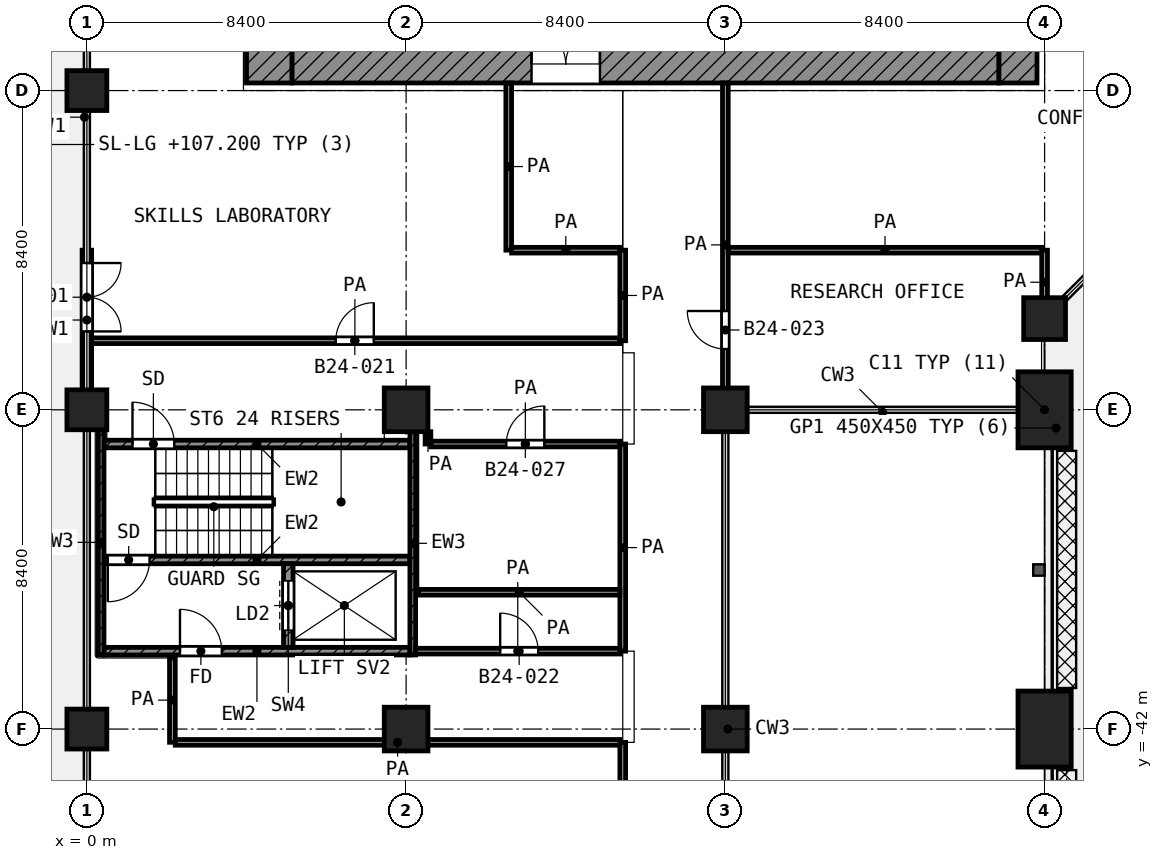
"""IFC4 building model, lengths in metres.
Left out: names, types, materials, properties, quantities, classifications, styles, units other than length and angle.
Written with IfcOpenShell. Run it as: python <this file> out.ifc"""

import sys

from ifc_helpers import new_model, si_unit, direction, frame, frame_2d, origin, origin_2d, place, context, subcontext, project, spatial, rectangle, extrude, element, fill, save


model = new_model("IFC4")
c1 = context("Model", 3, precision=1e-05, world=origin(), true_north=direction((0.0, 1.0)))
c2 = subcontext(c1, "Body", "Model", "MODEL_VIEW")
j1 = project(units=[si_unit("LENGTHUNIT", "METRE"), si_unit("PLANEANGLEUNIT", "RADIAN")], contexts=[c1])
p1 = place(None, origin())
s1 = spatial("IfcSite", under=j1, at=p1, CompositionType="ELEMENT")
p2 = place(p1, origin())
s2 = spatial("IfcBuilding", under=s1, at=p2, CompositionType="ELEMENT")
p3 = place(p2, frame((0.0, 0.0, 107.2)))
s3 = spatial("IfcBuildingStorey", under=s2, at=p3, CompositionType="ELEMENT", Elevation=107.2)
p4 = place(p3, frame((0.0, -25.2, 0.0), z_axis=(0.0, 0.0, 1.0), x_axis=(1.0, 0.0, 0.0)))
e1 = element("IfcColumn", 1, at=p4, inside=s3, PredefinedType="COLUMN", context=c2, shape_type="SweptSolid", body=[
    extrude(rectangle(XDim=1.05, YDim=1.05, at=origin_2d()), origin(), (0.0, 0.0, 1.0), 4.2),
])
p5 = place(p3, frame((25.2, -31.2, 0.0), z_axis=(0.0, 0.0, 1.0), x_axis=(1.0, 0.0, 0.0)))
e2 = element("IfcColumn", 2, at=p5, inside=s3, PredefinedType="COLUMN", context=c2, shape_type="SweptSolid", body=[
    extrude(rectangle(XDim=1.1, YDim=1.1, at=origin_2d()), origin(), (0.0, 0.0, 1.0), 4.2),
])
p6 = place(p3, frame((0.0, -33.6, 0.0), z_axis=(0.0, 0.0, 1.0), x_axis=(1.0, 0.0, 0.0)))
e3 = element("IfcColumn", 3, at=p6, inside=s3, PredefinedType="COLUMN", context=c2, shape_type="SweptSolid", body=[
    extrude(rectangle(XDim=1.05, YDim=1.05, at=origin_2d()), origin(), (0.0, 0.0, 1.0), 4.2),
])
for number, where, z_axis, x_axis in (
    (4, (8.4, -33.6, 0.0), (0.0, 0.0, 1.0), (1.0, 0.0, 0.0)),
    (5, (16.8, -33.6, 0.0), (0.0, 0.0, 1.0), (1.0, 0.0, 0.0)),
):
    element("IfcColumn", number, at=place(p3, frame(where, z_axis=z_axis, x_axis=x_axis)), inside=s3, PredefinedType="COLUMN", context=c2, shape_type="SweptSolid", body=[
        extrude(rectangle(XDim=1.15, YDim=1.15, at=origin_2d()), origin(), (0.0, 0.0, 1.0), 4.2),
    ])
p7 = place(p3, frame((0.0, -42.0, 0.0), z_axis=(0.0, 0.0, 1.0), x_axis=(1.0, 0.0, 0.0)))
e6 = element("IfcColumn", 6, at=p7, inside=s3, PredefinedType="COLUMN", context=c2, shape_type="SweptSolid", body=[
    extrude(rectangle(XDim=1.05, YDim=1.05, at=origin_2d()), origin(), (0.0, 0.0, 1.0), 4.2),
])
for number, where, z_axis, x_axis in (
    (7, (8.4, -42.0, 0.0), (0.0, 0.0, 1.0), (1.0, 0.0, 0.0)),
    (8, (16.8, -42.0, 0.0), (0.0, 0.0, 1.0), (1.0, 0.0, 0.0)),
):
    element("IfcColumn", number, at=place(p3, frame(where, z_axis=z_axis, x_axis=x_axis)), inside=s3, PredefinedType="COLUMN", context=c2, shape_type="SweptSolid", body=[
        extrude(rectangle(XDim=1.15, YDim=1.15, at=origin_2d()), origin(), (0.0, 0.0, 1.0), 4.2),
    ])
for number, where, z_axis, x_axis in (
    (9, (25.2, -42.0, 0.0), (0.0, 0.0, 1.0), (0.0, -1.0, 0.0)),
    (10, (25.2, -33.6, 0.0), (0.0, 0.0, 1.0), (0.0, -1.0, 0.0)),
):
    element("IfcColumn", number, at=place(p3, frame(where, z_axis=z_axis, x_axis=x_axis)), inside=s3, PredefinedType="COLUMN", context=c2, shape_type="SweptSolid", body=[
        extrude(rectangle(XDim=2.0, YDim=1.4, at=origin_2d()), origin(), (0.0, 0.0, 1.0), 4.2),
    ])
p8 = place(p3, frame((0.0, -29.4, 0.0), z_axis=(0.0, 0.0, 1.0), x_axis=(0.0, -1.0, 0.0)))
e11 = element("IfcWall", 11, at=p8, inside=s3, PredefinedType="SOLIDWALL", context=c2, shape_type="SweptSolid", body=[
    extrude(rectangle(XDim=3.675, YDim=0.25, at=frame_2d((1.837, 0.0))), origin(), (0.0, 0.0, 1.0), 3.48),
])
p9 = place(p8, frame((0.337, 0.0, 0.0)))
e12 = element("IfcOpeningElement", 12, at=p9, cuts=e11, PredefinedType="OPENING", context=c2, shape_type="SweptSolid", body=[
    extrude(rectangle(XDim=1.8, YDim=2.1, at=frame_2d((0.9, 1.05))), frame((0.0, 0.135, 0.0), z_axis=(0.0, -1.0, 0.0), x_axis=(1.0, 0.0, 0.0)), (0.0, 0.0, 1.0), 0.27),
])
p10 = place(p3, frame((4.8, -25.0, 0.0), z_axis=(0.0, 0.0, 1.0), x_axis=(0.0, 1.0, 0.0)))
e13 = element("IfcWall", 13, at=p10, inside=s3, PredefinedType="SHEAR", context=c2, shape_type="SweptSolid", body=[
    extrude(rectangle(XDim=19.6, YDim=1.2, at=frame_2d((9.8, 0.0))), origin(), (0.0, 0.0, 1.0), 3.6),
])
p11 = place(p10, frame((11.45, 0.0, 0.0)))
e14 = element("IfcOpeningElement", 14, at=p11, cuts=e13, PredefinedType="OPENING", context=c2, shape_type="SweptSolid", body=[
    extrude(rectangle(XDim=1.1, YDim=2.1, at=frame_2d((0.55, 1.05))), frame((0.0, 0.61, 0.0), z_axis=(0.0, -1.0, 0.0), x_axis=(1.0, 0.0, 0.0)), (0.0, 0.0, 1.0), 1.22),
])
p12 = place(p10, frame((2.15, 0.0, 0.0)))
e15 = element("IfcOpeningElement", 15, at=p12, cuts=e13, PredefinedType="OPENING", context=c2, shape_type="SweptSolid", body=[
    extrude(rectangle(XDim=1.1, YDim=2.1, at=frame_2d((0.55, 1.05))), frame((0.0, 0.61, 0.0), z_axis=(0.0, -1.0, 0.0), x_axis=(1.0, 0.0, 0.0)), (0.0, 0.0, 1.0), 1.22),
])
p13 = place(p3, frame((5.4, -24.5, 0.0), z_axis=(0.0, 0.0, 1.0), x_axis=(1.0, 0.0, 0.0)))
e16 = element("IfcWall", 16, at=p13, inside=s3, PredefinedType="SHEAR", context=c2, shape_type="SweptSolid", body=[
    extrude(rectangle(XDim=18.6, YDim=1.0, at=frame_2d((9.3, 0.0))), origin(), (0.0, 0.0, 1.0), 3.6),
])
p14 = place(p13, frame((6.3, 0.0, 0.0)))
e17 = element("IfcOpeningElement", 17, at=p14, cuts=e16, PredefinedType="OPENING", context=c2, shape_type="SweptSolid", body=[
    extrude(rectangle(XDim=1.8, YDim=2.1, at=frame_2d((0.9, 1.05))), frame((0.0, 0.51, 0.0), z_axis=(0.0, -1.0, 0.0), x_axis=(1.0, 0.0, 0.0)), (0.0, 0.0, 1.0), 1.02),
])
p15 = place(p3, frame((24.5, -25.0, 0.0), z_axis=(0.0, 0.0, 1.0), x_axis=(0.0, 1.0, 0.0)))
e18 = element("IfcWall", 18, at=p15, inside=s3, PredefinedType="SHEAR", context=c2, shape_type="SweptSolid", body=[
    extrude(rectangle(XDim=1.0, YDim=1.0, at=frame_2d((0.5, 0.0))), origin(), (0.0, 0.0, 1.0), 3.6),
])
p16 = place(p3, frame((0.375, -40.05, 0.0), z_axis=(0.0, 0.0, 1.0), x_axis=(0.0, 1.0, 0.0)))
e19 = element("IfcWall", 19, at=p16, inside=s3, PredefinedType="SHEAR", context=c2, shape_type="SweptSolid", body=[
    extrude(rectangle(XDim=5.925, YDim=0.15, at=frame_2d((2.962, 0.0))), origin(), (0.0, 0.0, 1.0), 3.6),
])
p17 = place(p3, frame((8.575, -40.05, 0.0), z_axis=(0.0, 0.0, 1.0), x_axis=(0.0, 1.0, 0.0)))
e20 = element("IfcWall", 20, at=p17, inside=s3, PredefinedType="SHEAR", context=c2, shape_type="SweptSolid", body=[
    extrude(rectangle(XDim=5.875, YDim=0.15, at=frame_2d((2.938, 0.0))), origin(), (0.0, 0.0, 1.0), 3.6),
])
p18 = place(p3, frame((0.45, -34.5, 0.0), z_axis=(0.0, 0.0, 1.0), x_axis=(1.0, 0.0, 0.0)))
e21 = element("IfcWall", 21, at=p18, inside=s3, PredefinedType="SHEAR", context=c2, shape_type="SweptSolid", body=[
    extrude(rectangle(XDim=8.05, YDim=0.2, at=frame_2d((4.025, 0.0))), origin(), (0.0, 0.0, 1.0), 3.6),
])
p19 = place(p18, frame((0.75, 0.0, 0.0)))
e22 = element("IfcOpeningElement", 22, at=p19, cuts=e21, PredefinedType="OPENING", context=c2, shape_type="SweptSolid", body=[
    extrude(rectangle(XDim=1.1, YDim=2.1, at=frame_2d((0.55, 1.05))), frame((0.0, 0.11, 0.0), z_axis=(0.0, -1.0, 0.0), x_axis=(1.0, 0.0, 0.0)), (0.0, 0.0, 1.0), 0.22),
])
p20 = place(p3, frame((0.45, -37.55, 0.0), z_axis=(0.0, 0.0, 1.0), x_axis=(1.0, 0.0, 0.0)))
e23 = element("IfcWall", 23, at=p20, inside=s3, PredefinedType="SHEAR", context=c2, shape_type="SweptSolid", body=[
    extrude(rectangle(XDim=8.05, YDim=0.2, at=frame_2d((4.025, 0.0))), origin(), (0.0, 0.0, 1.0), 3.6),
])
p21 = place(p20, frame((0.1, 0.0, 0.0)))
e24 = element("IfcOpeningElement", 24, at=p21, cuts=e23, PredefinedType="OPENING", context=c2, shape_type="SweptSolid", body=[
    extrude(rectangle(XDim=1.1, YDim=2.1, at=frame_2d((0.55, 1.05))), frame((0.0, 0.11, 0.0), z_axis=(0.0, -1.0, 0.0), x_axis=(1.0, 0.0, 0.0)), (0.0, 0.0, 1.0), 0.22),
])
p22 = place(p3, frame((0.45, -39.95, 0.0), z_axis=(0.0, 0.0, 1.0), x_axis=(1.0, 0.0, 0.0)))
e25 = element("IfcWall", 25, at=p22, inside=s3, PredefinedType="SHEAR", context=c2, shape_type="SweptSolid", body=[
    extrude(rectangle(XDim=8.05, YDim=0.2, at=frame_2d((4.025, 0.0))), origin(), (0.0, 0.0, 1.0), 3.6),
])
p23 = place(p22, frame((2.0, 0.0, 0.0)))
e26 = element("IfcOpeningElement", 26, at=p23, cuts=e25, PredefinedType="OPENING", context=c2, shape_type="SweptSolid", body=[
    extrude(rectangle(XDim=1.1, YDim=2.1, at=frame_2d((0.55, 1.05))), frame((0.0, 0.11, 0.0), z_axis=(0.0, -1.0, 0.0), x_axis=(1.0, 0.0, 0.0)), (0.0, 0.0, 1.0), 0.22),
])
p24 = place(p3, frame((5.3, -39.85, 0.0), z_axis=(0.0, 0.0, 1.0), x_axis=(0.0, 1.0, 0.0)))
e27 = element("IfcWall", 27, at=p24, inside=s3, PredefinedType="SHEAR", context=c2, shape_type="SweptSolid", body=[
    extrude(rectangle(XDim=2.2, YDim=0.25, at=frame_2d((1.1, 0.0))), origin(), (0.0, 0.0, 1.0), 3.6),
])
p25 = place(p24, frame((0.45, 0.0, 0.0)))
e28 = element("IfcOpeningElement", 28, at=p25, cuts=e27, PredefinedType="OPENING", context=c2, shape_type="SweptSolid", body=[
    extrude(rectangle(XDim=1.3, YDim=2.1, at=frame_2d((0.65, 1.05))), frame((0.0, 0.135, 0.0), z_axis=(0.0, -1.0, 0.0), x_axis=(1.0, 0.0, 0.0)), (0.0, 0.0, 1.0), 0.27),
])
p26 = place(p3, frame((2.326, -42.35, 0.0), z_axis=(0.0, 0.0, 1.0), x_axis=(1.0, 0.0, 0.0)))
e29 = element("IfcWall", 29, at=p26, inside=s3, PredefinedType="PARTITIONING", context=c2, shape_type="SweptSolid", body=[
    extrude(rectangle(XDim=11.699, YDim=0.15, at=frame_2d((5.85, 0.0))), origin(), (0.0, 0.0, 1.0), 3.6),
])
p27 = place(p3, frame((8.65, -39.95, 0.0), z_axis=(0.0, 0.0, 1.0), x_axis=(1.0, 0.0, 0.0)))
e30 = element("IfcWall", 30, at=p27, inside=s3, PredefinedType="PARTITIONING", context=c2, shape_type="SweptSolid", body=[
    extrude(rectangle(XDim=5.375, YDim=0.15, at=frame_2d((2.688, 0.0))), origin(), (0.0, 0.0, 1.0), 3.6),
])
p28 = place(p27, frame((2.225, 0.0, 0.0)))
e31 = element("IfcOpeningElement", 31, at=p28, cuts=e30, PredefinedType="OPENING", context=c2, shape_type="SweptSolid", body=[
    extrude(rectangle(XDim=1.0, YDim=2.1, at=frame_2d((0.5, 1.05))), frame((0.0, 0.085, 0.0), z_axis=(0.0, -1.0, 0.0), x_axis=(1.0, 0.0, 0.0)), (0.0, 0.0, 1.0), 0.17),
])
p29 = place(p3, frame((8.73, -38.4, 0.0), z_axis=(0.0, 0.0, 1.0), x_axis=(1.0, 0.0, 0.0)))
e32 = element("IfcWall", 32, at=p29, inside=s3, PredefinedType="PARTITIONING", context=c2, shape_type="SweptSolid", body=[
    extrude(rectangle(XDim=5.295, YDim=0.15, at=frame_2d((2.647, 0.0))), origin(), (0.0, 0.0, 1.0), 3.6),
])
p30 = place(p3, frame((9.05, -34.5, 0.0), z_axis=(0.0, 0.0, 1.0), x_axis=(1.0, 0.0, 0.0)))
e33 = element("IfcWall", 33, at=p30, inside=s3, PredefinedType="PARTITIONING", context=c2, shape_type="SweptSolid", body=[
    extrude(rectangle(XDim=4.975, YDim=0.15, at=frame_2d((2.487, 0.0))), origin(), (0.0, 0.0, 1.0), 3.6),
])
p31 = place(p30, frame((1.987, 0.0, 0.0)))
e34 = element("IfcOpeningElement", 34, at=p31, cuts=e33, PredefinedType="OPENING", context=c2, shape_type="SweptSolid", body=[
    extrude(rectangle(XDim=1.0, YDim=2.1, at=frame_2d((0.5, 1.05))), frame((0.0, 0.085, 0.0), z_axis=(0.0, -1.0, 0.0), x_axis=(1.0, 0.0, 0.0)), (0.0, 0.0, 1.0), 0.17),
])
p32 = place(p3, frame((0.08, -31.782, 0.0), z_axis=(0.0, 0.0, 1.0), x_axis=(1.0, 0.0, 0.0)))
e35 = element("IfcWall", 35, at=p32, inside=s3, PredefinedType="PARTITIONING", context=c2, shape_type="SweptSolid", body=[
    extrude(rectangle(XDim=13.945, YDim=0.15, at=frame_2d((6.972, 0.0))), origin(), (0.0, 0.0, 1.0), 3.6),
])
p33 = place(p32, frame((6.47, 0.0, 0.0)))
e36 = element("IfcOpeningElement", 36, at=p33, cuts=e35, PredefinedType="OPENING", context=c2, shape_type="SweptSolid", body=[
    extrude(rectangle(XDim=1.0, YDim=2.1, at=frame_2d((0.5, 1.05))), frame((0.0, 0.085, 0.0), z_axis=(0.0, -1.0, 0.0), x_axis=(1.0, 0.0, 0.0)), (0.0, 0.0, 1.0), 0.17),
])
p34 = place(p3, frame((11.177, -29.4, 0.0), z_axis=(0.0, 0.0, 1.0), x_axis=(1.0, 0.0, 0.0)))
e37 = element("IfcWall", 37, at=p34, inside=s3, PredefinedType="PARTITIONING", context=c2, shape_type="SweptSolid", body=[
    extrude(rectangle(XDim=2.848, YDim=0.15, at=frame_2d((1.424, 0.0))), origin(), (0.0, 0.0, 1.0), 3.6),
])
p35 = place(p3, frame((16.875, -29.4, 0.0), z_axis=(0.0, 0.0, 1.0), x_axis=(1.0, 0.0, 0.0)))
e38 = element("IfcWall", 38, at=p35, inside=s3, PredefinedType="PARTITIONING", context=c2, shape_type="SweptSolid", body=[
    extrude(rectangle(XDim=8.25, YDim=0.15, at=frame_2d((4.125, 0.0))), origin(), (0.0, 0.0, 1.0), 3.6),
])
p36 = place(p3, frame((2.25, -42.348, 0.0), z_axis=(0.0, 0.0, 1.0), x_axis=(0.0, 1.0, 0.0)))
e39 = element("IfcWall", 39, at=p36, inside=s3, PredefinedType="PARTITIONING", context=c2, shape_type="SweptSolid", body=[
    extrude(rectangle(XDim=2.218, YDim=0.15, at=frame_2d((1.109, 0.0))), origin(), (0.0, 0.0, 1.0), 3.6),
])
p37 = place(p3, frame((8.975, -34.5, 0.0), z_axis=(0.0, 0.0, 1.0), x_axis=(0.0, 1.0, 0.0)))
e40 = element("IfcWall", 40, at=p37, inside=s3, PredefinedType="PARTITIONING", context=c2, shape_type="SweptSolid", body=[
    extrude(rectangle(XDim=0.324, YDim=0.15, at=frame_2d((0.162, 0.0))), origin(), (0.0, 0.0, 1.0), 3.6),
])
p38 = place(p3, frame((11.1, -29.399, 0.0), z_axis=(0.0, 0.0, 1.0), x_axis=(0.0, 1.0, 0.0)))
e41 = element("IfcWall", 41, at=p38, inside=s3, PredefinedType="PARTITIONING", context=c2, shape_type="SweptSolid", body=[
    extrude(rectangle(XDim=4.399, YDim=0.15, at=frame_2d((2.199, 0.0))), origin(), (0.0, 0.0, 1.0), 3.6),
])
p39 = place(p3, frame((14.1, -58.72, 0.0), z_axis=(0.0, 0.0, 1.0), x_axis=(0.0, 1.0, 0.0)))
e42 = element("IfcWall", 42, at=p39, inside=s3, PredefinedType="PARTITIONING", context=c2, shape_type="SweptSolid", body=[
    extrude(rectangle(XDim=16.37, YDim=0.15, at=frame_2d((8.185, 0.0))), origin(), (0.0, 0.0, 1.0), 2.7),
])
p40 = place(p39, frame((7.395, 0.0, 0.0)))
e43 = element("IfcOpeningElement", 43, at=p40, cuts=e42, PredefinedType="OPENING", context=c2, shape_type="SweptSolid", body=[
    extrude(rectangle(XDim=1.5, YDim=2.1, at=frame_2d((0.75, 1.05))), frame((0.0, 0.085, 0.0), z_axis=(0.0, -1.0, 0.0), x_axis=(1.0, 0.0, 0.0)), (0.0, 0.0, 1.0), 0.17),
])
p41 = place(p3, frame((14.1, -39.95, 0.0), z_axis=(0.0, 0.0, 1.0), x_axis=(0.0, 1.0, 0.0)))
e44 = element("IfcWall", 44, at=p41, inside=s3, PredefinedType="PARTITIONING", context=c2, shape_type="SweptSolid", body=[
    extrude(rectangle(XDim=5.45, YDim=0.15, at=frame_2d((2.725, 0.0))), origin(), (0.0, 0.0, 1.0), 3.6),
])
p42 = place(p3, frame((14.1, -31.782, 0.0), z_axis=(0.0, 0.0, 1.0), x_axis=(0.0, 1.0, 0.0)))
e45 = element("IfcWall", 45, at=p42, inside=s3, PredefinedType="PARTITIONING", context=c2, shape_type="SweptSolid", body=[
    extrude(rectangle(XDim=2.382, YDim=0.15, at=frame_2d((1.191, 0.0))), origin(), (0.0, 0.0, 1.0), 3.6),
])
p43 = place(p3, frame((16.8, -33.52, 0.0), z_axis=(0.0, 0.0, 1.0), x_axis=(0.0, 1.0, 0.0)))
e46 = element("IfcWall", 46, at=p43, inside=s3, PredefinedType="PARTITIONING", context=c2, shape_type="SweptSolid", body=[
    extrude(rectangle(XDim=8.52, YDim=0.15, at=frame_2d((4.26, 0.0))), origin(), (0.0, 0.0, 1.0), 3.6),
])
p44 = place(p43, frame((1.52, 0.0, 0.0)))
e47 = element("IfcOpeningElement", 47, at=p44, cuts=e46, PredefinedType="OPENING", context=c2, shape_type="SweptSolid", body=[
    extrude(rectangle(XDim=1.0, YDim=2.1, at=frame_2d((0.5, 1.05))), frame((0.0, 0.085, 0.0), z_axis=(0.0, -1.0, 0.0), x_axis=(1.0, 0.0, 0.0)), (0.0, 0.0, 1.0), 0.17),
])
p45 = place(p3, frame((25.2, -31.087, 0.0), z_axis=(0.0, 0.0, 1.0), x_axis=(0.0, 1.0, 0.0)))
e48 = element("IfcWall", 48, at=p45, inside=s3, PredefinedType="PARTITIONING", context=c2, shape_type="SweptSolid", body=[
    extrude(rectangle(XDim=1.687, YDim=0.15, at=frame_2d((0.844, 0.0))), origin(), (0.0, 0.0, 1.0), 3.6),
])
p46 = place(p9, origin())
e49 = element("IfcDoor", 49, at=p46, inside=s3, OperationType="DOUBLE_DOOR_SINGLE_SWING", PredefinedType="DOOR", context=c2, shape_type="SweptSolid", body=[
    extrude(rectangle(XDim=1.8, YDim=2.1, at=frame_2d((0.9, 1.05))), frame((0.0, 0.025, 0.0), z_axis=(0.0, -1.0, 0.0), x_axis=(1.0, 0.0, 0.0)), (0.0, 0.0, 1.0), 0.05),
])
fill(e12, e49)
p47 = place(p14, origin())
e50 = element("IfcDoor", 50, at=p47, inside=s3, OperationType="DOUBLE_DOOR_SINGLE_SWING", PredefinedType="DOOR", context=c2, shape_type="SweptSolid", body=[
    extrude(rectangle(XDim=1.8, YDim=2.1, at=frame_2d((0.9, 1.05))), frame((0.0, 0.025, 0.0), z_axis=(0.0, -1.0, 0.0), x_axis=(1.0, 0.0, 0.0)), (0.0, 0.0, 1.0), 0.05),
])
fill(e17, e50)
p48 = place(p19, origin())
e51 = element("IfcDoor", 51, at=p48, inside=s3, OperationType="SINGLE_SWING_LEFT", PredefinedType="DOOR", context=c2, shape_type="SweptSolid", body=[
    extrude(rectangle(XDim=1.1, YDim=2.1, at=frame_2d((0.55, 1.05))), frame((0.0, 0.025, 0.0), z_axis=(0.0, -1.0, 0.0), x_axis=(1.0, 0.0, 0.0)), (0.0, 0.0, 1.0), 0.05),
])
fill(e22, e51)
p49 = place(p21, frame((1.1, 0.0, 0.0), z_axis=(0.0, 0.0, 1.0), x_axis=(-1.0, 0.0, 0.0)))
e52 = element("IfcDoor", 52, at=p49, inside=s3, OperationType="SINGLE_SWING_LEFT", PredefinedType="DOOR", context=c2, shape_type="SweptSolid", body=[
    extrude(rectangle(XDim=1.1, YDim=2.1, at=frame_2d((0.55, 1.05))), frame((0.0, 0.025, 0.0), z_axis=(0.0, -1.0, 0.0), x_axis=(1.0, 0.0, 0.0)), (0.0, 0.0, 1.0), 0.05),
])
fill(e24, e52)
p50 = place(p25, origin())
e53 = element("IfcDoor", 53, at=p50, inside=s3, OperationType="DOUBLE_DOOR_SLIDING", PredefinedType="DOOR", context=c2, shape_type="SweptSolid", body=[
    extrude(rectangle(XDim=1.3, YDim=2.1, at=frame_2d((0.65, 1.05))), frame((0.0, 0.025, 0.0), z_axis=(0.0, -1.0, 0.0), x_axis=(1.0, 0.0, 0.0)), (0.0, 0.0, 1.0), 0.05),
])
fill(e28, e53)
p51 = place(p23, origin())
e54 = element("IfcDoor", 54, at=p51, inside=s3, OperationType="SINGLE_SWING_LEFT", PredefinedType="DOOR", context=c2, shape_type="SweptSolid", body=[
    extrude(rectangle(XDim=1.1, YDim=2.1, at=frame_2d((0.55, 1.05))), frame((0.0, 0.025, 0.0), z_axis=(0.0, -1.0, 0.0), x_axis=(1.0, 0.0, 0.0)), (0.0, 0.0, 1.0), 0.05),
])
fill(e26, e54)
p52 = place(p33, origin())
e55 = element("IfcDoor", 55, at=p52, inside=s3, OperationType="SINGLE_SWING_RIGHT", PredefinedType="DOOR", context=c2, shape_type="SweptSolid", body=[
    extrude(rectangle(XDim=1.0, YDim=2.1, at=frame_2d((0.5, 1.05))), frame((0.0, 0.025, 0.0), z_axis=(0.0, -1.0, 0.0), x_axis=(1.0, 0.0, 0.0)), (0.0, 0.0, 1.0), 0.05),
])
fill(e36, e55)
p53 = place(p28, origin())
e56 = element("IfcDoor", 56, at=p53, inside=s3, OperationType="SINGLE_SWING_LEFT", PredefinedType="DOOR", context=c2, shape_type="SweptSolid", body=[
    extrude(rectangle(XDim=1.0, YDim=2.1, at=frame_2d((0.5, 1.05))), frame((0.0, 0.025, 0.0), z_axis=(0.0, -1.0, 0.0), x_axis=(1.0, 0.0, 0.0)), (0.0, 0.0, 1.0), 0.05),
])
fill(e31, e56)
p54 = place(p44, origin())
e57 = element("IfcDoor", 57, at=p54, inside=s3, OperationType="SINGLE_SWING_RIGHT", PredefinedType="DOOR", context=c2, shape_type="SweptSolid", body=[
    extrude(rectangle(XDim=1.0, YDim=2.1, at=frame_2d((0.5, 1.05))), frame((0.0, 0.025, 0.0), z_axis=(0.0, -1.0, 0.0), x_axis=(1.0, 0.0, 0.0)), (0.0, 0.0, 1.0), 0.05),
])
fill(e47, e57)
p55 = place(p31, origin())
e58 = element("IfcDoor", 58, at=p55, inside=s3, OperationType="SINGLE_SWING_RIGHT", PredefinedType="DOOR", context=c2, shape_type="SweptSolid", body=[
    extrude(rectangle(XDim=1.0, YDim=2.1, at=frame_2d((0.5, 1.05))), frame((0.0, 0.025, 0.0), z_axis=(0.0, -1.0, 0.0), x_axis=(1.0, 0.0, 0.0)), (0.0, 0.0, 1.0), 0.05),
])
fill(e34, e58)
save(model, sys.argv[1])
